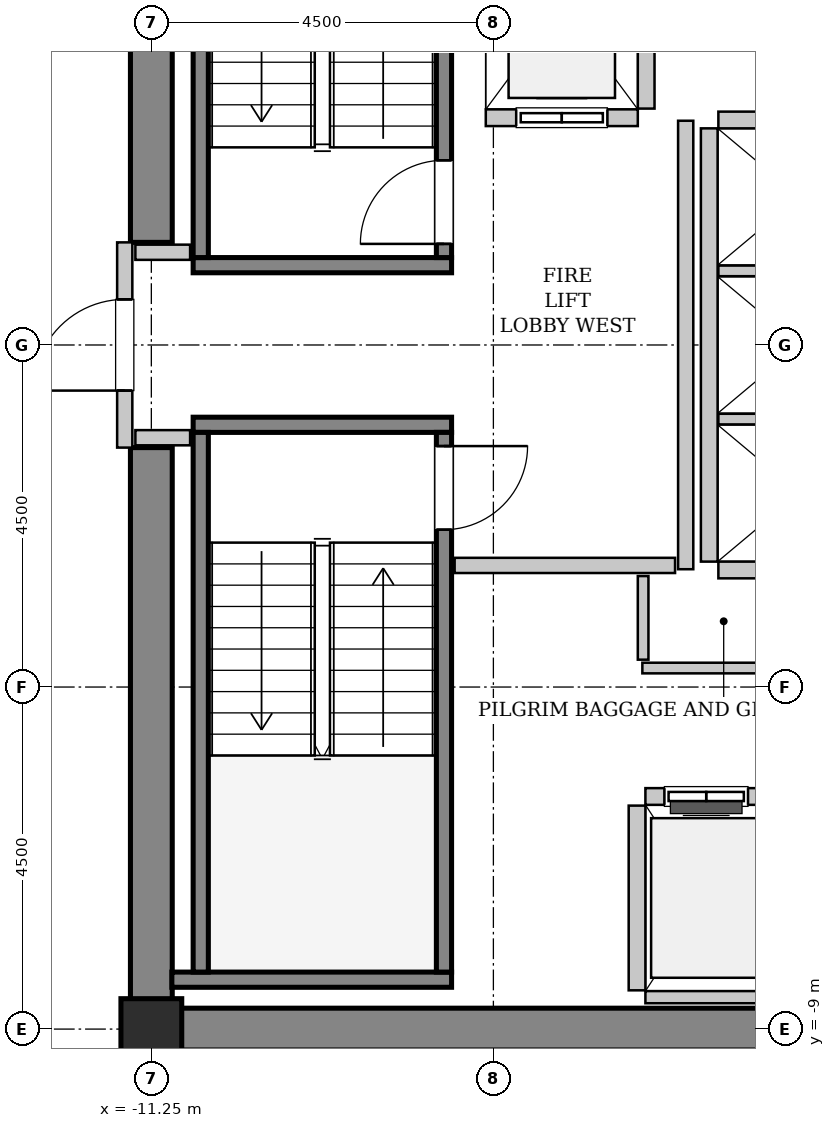
"""IFC4 building model, lengths in metres.
Left out: names, types, materials, properties, quantities, classifications, styles, units other than length and angle.
Written with IfcOpenShell. Run it as: python <this file> out.ifc"""

import sys

from ifc_helpers import new_model, si_unit, direction, frame, frame_2d, origin, origin_2d, place, context, subcontext, project, spatial, rectangle, hollow_rectangle, extrude, source, transform, mapped, element, fill, save


model = new_model("IFC4")
c1 = context("Model", 3, precision=1e-05, world=origin(), true_north=direction((0.0, 1.0)))
c2 = subcontext(c1, "Body", "Model", "MODEL_VIEW")
j1 = project(units=[si_unit("LENGTHUNIT", "METRE"), si_unit("PLANEANGLEUNIT", "RADIAN")], contexts=[c1])
p1 = place(None, origin())
s1 = spatial("IfcSite", under=j1, at=p1, CompositionType="ELEMENT")
p2 = place(p1, origin())
s2 = spatial("IfcBuilding", under=s1, at=p2, CompositionType="ELEMENT")
p3 = place(p2, frame((0.0, 0.0, 190.6)))
s3 = spatial("IfcBuildingStorey", under=s2, at=p3, CompositionType="ELEMENT", Elevation=190.6)
m1 = source(origin(), c2, "Body", "SweptSolid", [
    extrude(rectangle(XDim=9.975, YDim=0.55, at=frame_2d((4.987, 0.0))), origin(), (0.0, 0.0, 1.0), 3.8),
])
p4 = place(p3, frame((-11.525, -9.0, 0.0), z_axis=(0.0, 0.0, 1.0), x_axis=(1.0, 0.0, 0.0)))
e1 = element("IfcWall", 1, at=p4, inside=s3, PredefinedType="SHEAR", context=c2, shape_type="MappedRepresentation", body=[
    mapped(m1, transform((0.0, 0.0, 0.0), x_axis=(1.0, 0.0, 0.0), y_axis=(0.0, 1.0, 0.0), z_axis=(0.0, 0.0, 1.0), scale=1.0)),
])
m2 = source(origin(), c2, "Body", "SweptSolid", [
    extrude(rectangle(XDim=7.375, YDim=0.55, at=frame_2d((3.688, 0.0))), origin(), (0.0, 0.0, 1.0), 3.8),
])
for number, where, z_axis, x_axis in (
    (2, (-11.25, -8.725, 0.0), (0.0, 0.0, 1.0), (0.0, 1.0, 0.0)),
    (3, (-11.25, 1.35, 0.0), (0.0, 0.0, 1.0), (0.0, 1.0, 0.0)),
):
    element("IfcWall", number, at=place(p3, frame(where, z_axis=z_axis, x_axis=x_axis)), inside=s3, PredefinedType="SHEAR", context=c2, shape_type="MappedRepresentation", body=[
        mapped(m2, transform((0.0, 0.0, 0.0), x_axis=(1.0, 0.0, 0.0), y_axis=(0.0, 1.0, 0.0), z_axis=(0.0, 0.0, 1.0), scale=1.0)),
    ])
m3 = source(origin(), c2, "Body", "SweptSolid", [
    extrude(hollow_rectangle(XDim=0.8, YDim=0.8, WallThickness=0.04, InnerFilletRadius=0.04, OuterFilletRadius=0.08, at=origin_2d()), origin(), (0.0, 0.0, 1.0), 3.8),
])
p5 = place(p3, frame((-11.25, -9.0, 0.0), z_axis=(0.0, 0.0, 1.0), x_axis=(1.0, 0.0, 0.0)))
e4 = element("IfcColumn", 4, at=p5, inside=s3, PredefinedType="COLUMN", context=c2, shape_type="MappedRepresentation", body=[
    mapped(m3, transform((0.0, 0.0, 0.0), x_axis=(1.0, 0.0, 0.0), y_axis=(0.0, 1.0, 0.0), z_axis=(0.0, 0.0, 1.0), scale=1.0)),
])
m4 = source(origin(), c2, "Body", "SweptSolid", [
    extrude(rectangle(XDim=3.4, YDim=0.2, at=frame_2d((1.7, 0.0))), origin(), (0.0, 0.0, 1.0), 3.8),
])
p6 = place(p3, frame((-7.3, 1.05, 0.0), z_axis=(0.0, 0.0, 1.0), x_axis=(-1.0, 0.0, 0.0)))
e5 = element("IfcWall", 5, at=p6, inside=s3, PredefinedType="SOLIDWALL", context=c2, shape_type="MappedRepresentation", body=[
    mapped(m4, transform((0.0, 0.0, 0.0), x_axis=(1.0, 0.0, 0.0), y_axis=(0.0, 1.0, 0.0), z_axis=(0.0, 0.0, 1.0), scale=1.0)),
])
m5 = source(origin(), c2, "Body", "SweptSolid", [
    extrude(rectangle(XDim=7.1, YDim=0.2, at=frame_2d((3.55, 0.0))), origin(), (0.0, 0.0, 1.0), 3.8),
])
p7 = place(p3, frame((-7.4, 1.15, 0.0), z_axis=(0.0, 0.0, 1.0), x_axis=(0.0, 1.0, 0.0)))
e6 = element("IfcWall", 6, at=p7, inside=s3, PredefinedType="SOLIDWALL", context=c2, shape_type="MappedRepresentation", body=[
    mapped(m5, transform((0.0, 0.0, 0.0), x_axis=(1.0, 0.0, 0.0), y_axis=(0.0, 1.0, 0.0), z_axis=(0.0, 0.0, 1.0), scale=1.0)),
])
p8 = place(p7, frame((0.18, 0.0, 0.0)))
e7 = element("IfcOpeningElement", 7, at=p8, cuts=e6, PredefinedType="OPENING", context=c2, shape_type="SweptSolid", body=[
    extrude(rectangle(XDim=1.1, YDim=2.15, at=frame_2d((0.55, 1.075))), frame((0.0, 0.11, 0.0), z_axis=(0.0, -1.0, 0.0), x_axis=(1.0, 0.0, 0.0)), (0.0, 0.0, 1.0), 0.22),
])
p9 = place(p3, frame((-10.6, 1.15, 0.0), z_axis=(0.0, 0.0, 1.0), x_axis=(0.0, 1.0, 0.0)))
e8 = element("IfcWall", 8, at=p9, inside=s3, PredefinedType="SOLIDWALL", context=c2, shape_type="MappedRepresentation", body=[
    mapped(m5, transform((0.0, 0.0, 0.0), x_axis=(1.0, 0.0, 0.0), y_axis=(0.0, 1.0, 0.0), z_axis=(0.0, 0.0, 1.0), scale=1.0)),
])
p10 = place(p3, frame((-10.7, -1.05, 0.0), z_axis=(0.0, 0.0, 1.0), x_axis=(1.0, 0.0, 0.0)))
e9 = element("IfcWall", 9, at=p10, inside=s3, PredefinedType="SOLIDWALL", context=c2, shape_type="MappedRepresentation", body=[
    mapped(m4, transform((0.0, 0.0, 0.0), x_axis=(1.0, 0.0, 0.0), y_axis=(0.0, 1.0, 0.0), z_axis=(0.0, 0.0, 1.0), scale=1.0)),
])
m6 = source(origin(), c2, "Body", "SweptSolid", [
    extrude(rectangle(XDim=3.68, YDim=0.2, at=frame_2d((1.84, 0.0))), origin(), (0.0, 0.0, 1.0), 3.8),
])
p11 = place(p3, frame((-10.98, -8.35, 0.0), z_axis=(0.0, 0.0, 1.0), x_axis=(1.0, 0.0, 0.0)))
e10 = element("IfcWall", 10, at=p11, inside=s3, PredefinedType="SOLIDWALL", context=c2, shape_type="MappedRepresentation", body=[
    mapped(m6, transform((0.0, 0.0, 0.0), x_axis=(1.0, 0.0, 0.0), y_axis=(0.0, 1.0, 0.0), z_axis=(0.0, 0.0, 1.0), scale=1.0)),
])
p12 = place(p3, frame((-10.6, -1.15, 0.0), z_axis=(0.0, 0.0, 1.0), x_axis=(0.0, -1.0, 0.0)))
e11 = element("IfcWall", 11, at=p12, inside=s3, PredefinedType="SOLIDWALL", context=c2, shape_type="MappedRepresentation", body=[
    mapped(m5, transform((0.0, 0.0, 0.0), x_axis=(1.0, 0.0, 0.0), y_axis=(0.0, 1.0, 0.0), z_axis=(0.0, 0.0, 1.0), scale=1.0)),
])
p13 = place(p3, frame((-7.4, -1.15, 0.0), z_axis=(0.0, 0.0, 1.0), x_axis=(0.0, -1.0, 0.0)))
e12 = element("IfcWall", 12, at=p13, inside=s3, PredefinedType="SOLIDWALL", context=c2, shape_type="MappedRepresentation", body=[
    mapped(m5, transform((0.0, 0.0, 0.0), x_axis=(1.0, 0.0, 0.0), y_axis=(0.0, 1.0, 0.0), z_axis=(0.0, 0.0, 1.0), scale=1.0)),
])
p14 = place(p13, frame((0.18, 0.0, 0.0)))
e13 = element("IfcOpeningElement", 13, at=p14, cuts=e12, PredefinedType="OPENING", context=c2, shape_type="SweptSolid", body=[
    extrude(rectangle(XDim=1.1, YDim=2.15, at=frame_2d((0.55, 1.075))), frame((0.0, 0.11, 0.0), z_axis=(0.0, -1.0, 0.0), x_axis=(1.0, 0.0, 0.0)), (0.0, 0.0, 1.0), 0.22),
])
m7 = source(origin(), c2, "Body", "SweptSolid", [
    extrude(rectangle(XDim=2.0, YDim=0.22, at=frame_2d((1.0, 0.0))), origin(), (0.0, 0.0, 1.0), 3.535),
])
p15 = place(p3, frame((-6.85, 2.99, 0.0), z_axis=(0.0, 0.0, 1.0), x_axis=(1.0, 0.0, 0.0)))
e14 = element("IfcWall", 14, at=p15, inside=s3, PredefinedType="SOLIDWALL", context=c2, shape_type="MappedRepresentation", body=[
    mapped(m7, transform((0.0, 0.0, 0.0), x_axis=(1.0, 0.0, 0.0), y_axis=(0.0, 1.0, 0.0), z_axis=(0.0, 0.0, 1.0), scale=1.0)),
])
p16 = place(p15, frame((0.4, 0.0, 0.0)))
e15 = element("IfcOpeningElement", 15, at=p16, cuts=e14, PredefinedType="OPENING", context=c2, shape_type="SweptSolid", body=[
    extrude(rectangle(XDim=1.2, YDim=2.2, at=frame_2d((0.6, 1.1))), frame((0.0, 0.12, 0.0), z_axis=(0.0, -1.0, 0.0), x_axis=(1.0, 0.0, 0.0)), (0.0, 0.0, 1.0), 0.24),
])
m8 = source(origin(), c2, "Body", "SweptSolid", [
    extrude(rectangle(XDim=2.68, YDim=0.22, at=frame_2d((1.34, 0.0))), origin(), (0.0, 0.0, 1.0), 3.535),
])
p17 = place(p3, frame((-4.74, 3.11, 0.0), z_axis=(0.0, 0.0, 1.0), x_axis=(0.0, 1.0, 0.0)))
e16 = element("IfcWall", 16, at=p17, inside=s3, PredefinedType="SOLIDWALL", context=c2, shape_type="MappedRepresentation", body=[
    mapped(m8, transform((0.0, 0.0, 0.0), x_axis=(1.0, 0.0, 0.0), y_axis=(0.0, 1.0, 0.0), z_axis=(0.0, 0.0, 1.0), scale=1.0)),
])
m9 = source(origin(), c2, "Body", "SweptSolid", [
    extrude(rectangle(XDim=3.2, YDim=0.22, at=frame_2d((1.6, 0.0))), origin(), (0.0, 0.0, 1.0), 3.535),
])
p18 = place(p3, frame((-1.55, -5.94, 0.0), z_axis=(0.0, 0.0, 1.0), x_axis=(-1.0, 0.0, 0.0)))
e17 = element("IfcWall", 17, at=p18, inside=s3, PredefinedType="SOLIDWALL", context=c2, shape_type="MappedRepresentation", body=[
    mapped(m9, transform((0.0, 0.0, 0.0), x_axis=(1.0, 0.0, 0.0), y_axis=(0.0, 1.0, 0.0), z_axis=(0.0, 0.0, 1.0), scale=1.0)),
])
p19 = place(p18, frame((1.85, 0.0, 0.0)))
e18 = element("IfcOpeningElement", 18, at=p19, cuts=e17, PredefinedType="OPENING", context=c2, shape_type="SweptSolid", body=[
    extrude(rectangle(XDim=1.1, YDim=2.2, at=frame_2d((0.55, 1.1))), frame((0.0, 0.12, 0.0), z_axis=(0.0, -1.0, 0.0), x_axis=(1.0, 0.0, 0.0)), (0.0, 0.0, 1.0), 0.24),
])
p20 = place(p18, frame((0.225, 0.0, 0.0)))
e19 = element("IfcOpeningElement", 19, at=p20, cuts=e17, PredefinedType="OPENING", context=c2, shape_type="SweptSolid", body=[
    extrude(rectangle(XDim=1.1, YDim=2.2, at=frame_2d((0.55, 1.1))), frame((0.0, 0.12, 0.0), z_axis=(0.0, -1.0, 0.0), x_axis=(1.0, 0.0, 0.0)), (0.0, 0.0, 1.0), 0.24),
])
m10 = source(origin(), c2, "Body", "SweptSolid", [
    extrude(rectangle(XDim=3.2, YDim=0.16, at=frame_2d((1.6, 0.0))), origin(), (0.0, 0.0, 1.0), 2.425),
])
p21 = place(p3, frame((-4.75, -8.58, 0.0), z_axis=(0.0, 0.0, 1.0), x_axis=(1.0, 0.0, 0.0)))
e20 = element("IfcWall", 20, at=p21, inside=s3, PredefinedType="PARTITIONING", context=c2, shape_type="MappedRepresentation", body=[
    mapped(m10, transform((0.0, 0.0, 0.0), x_axis=(1.0, 0.0, 0.0), y_axis=(0.0, 1.0, 0.0), z_axis=(0.0, 0.0, 1.0), scale=1.0)),
])
m11 = source(origin(), c2, "Body", "SweptSolid", [
    extrude(rectangle(XDim=2.43, YDim=0.22, at=frame_2d((1.215, 0.0))), origin(), (0.0, 0.0, 1.0), 3.535),
])
p22 = place(p3, frame((-4.86, -6.06, 0.0), z_axis=(0.0, 0.0, 1.0), x_axis=(0.0, -1.0, 0.0)))
e21 = element("IfcWall", 21, at=p22, inside=s3, PredefinedType="SOLIDWALL", context=c2, shape_type="MappedRepresentation", body=[
    mapped(m11, transform((0.0, 0.0, 0.0), x_axis=(1.0, 0.0, 0.0), y_axis=(0.0, 1.0, 0.0), z_axis=(0.0, 0.0, 1.0), scale=1.0)),
])
m12 = source(origin(), c2, "Body", "SweptSolid", [
    extrude(rectangle(XDim=5.7, YDim=0.22, at=frame_2d((2.85, 0.0))), origin(), (0.0, 0.0, 1.0), 3.535),
])
p23 = place(p3, frame((-3.91, 2.85, 0.0), z_axis=(0.0, 0.0, 1.0), x_axis=(0.0, -1.0, 0.0)))
e22 = element("IfcWall", 22, at=p23, inside=s3, PredefinedType="SOLIDWALL", context=c2, shape_type="MappedRepresentation", body=[
    mapped(m12, transform((0.0, 0.0, 0.0), x_axis=(1.0, 0.0, 0.0), y_axis=(0.0, 1.0, 0.0), z_axis=(0.0, 0.0, 1.0), scale=1.0)),
])
m13 = source(origin(), c2, "Body", "SweptSolid", [
    extrude(rectangle(XDim=2.13, YDim=0.22, at=frame_2d((1.065, 0.0))), origin(), (0.0, 0.0, 1.0), 3.535),
])
p24 = place(p3, frame((-3.79, -2.96, 0.0), z_axis=(0.0, 0.0, 1.0), x_axis=(1.0, 0.0, 0.0)))
e23 = element("IfcWall", 23, at=p24, inside=s3, PredefinedType="SOLIDWALL", context=c2, shape_type="MappedRepresentation", body=[
    mapped(m13, transform((0.0, 0.0, 0.0), x_axis=(1.0, 0.0, 0.0), y_axis=(0.0, 1.0, 0.0), z_axis=(0.0, 0.0, 1.0), scale=1.0)),
])
m14 = source(origin(), c2, "Body", "SweptSolid", [
    extrude(rectangle(XDim=2.13, YDim=0.14, at=frame_2d((1.065, 0.0))), origin(), (0.0, 0.0, 1.0), 3.535),
])
for number, where, z_axis, x_axis in (
    (24, (-3.79, -0.975, 0.0), (0.0, 0.0, 1.0), (1.0, 0.0, 0.0)),
    (25, (-3.79, 0.975, 0.0), (0.0, 0.0, 1.0), (1.0, 0.0, 0.0)),
):
    element("IfcWall", number, at=place(p3, frame(where, z_axis=z_axis, x_axis=x_axis)), inside=s3, PredefinedType="PARTITIONING", context=c2, shape_type="MappedRepresentation", body=[
        mapped(m14, transform((0.0, 0.0, 0.0), x_axis=(1.0, 0.0, 0.0), y_axis=(0.0, 1.0, 0.0), z_axis=(0.0, 0.0, 1.0), scale=1.0)),
    ])
p25 = place(p3, frame((-1.66, 2.96, 0.0), z_axis=(0.0, 0.0, 1.0), x_axis=(-1.0, 0.0, 0.0)))
e26 = element("IfcWall", 26, at=p25, inside=s3, PredefinedType="SOLIDWALL", context=c2, shape_type="MappedRepresentation", body=[
    mapped(m13, transform((0.0, 0.0, 0.0), x_axis=(1.0, 0.0, 0.0), y_axis=(0.0, 1.0, 0.0), z_axis=(0.0, 0.0, 1.0), scale=1.0)),
])
m15 = source(origin(), c2, "Body", "SweptSolid", [
    extrude(rectangle(XDim=2.7, YDim=0.2, at=frame_2d((1.35, 0.0))), origin(), (0.0, 0.0, 1.0), 2.425),
])
p26 = place(p3, frame((-11.6, -1.35, 0.0), z_axis=(0.0, 0.0, 1.0), x_axis=(0.0, 1.0, 0.0)))
e27 = element("IfcWall", 27, at=p26, inside=s3, PredefinedType="PARTITIONING", context=c2, shape_type="MappedRepresentation", body=[
    mapped(m15, transform((0.0, 0.0, 0.0), x_axis=(1.0, 0.0, 0.0), y_axis=(0.0, 1.0, 0.0), z_axis=(0.0, 0.0, 1.0), scale=1.0)),
])
p27 = place(p26, frame((0.75, 0.0, 0.0)))
e28 = element("IfcOpeningElement", 28, at=p27, cuts=e27, PredefinedType="OPENING", context=c2, shape_type="SweptSolid", body=[
    extrude(rectangle(XDim=1.2, YDim=2.15, at=frame_2d((0.6, 1.075))), frame((0.0, 0.11, 0.0), z_axis=(0.0, -1.0, 0.0), x_axis=(1.0, 0.0, 0.0)), (0.0, 0.0, 1.0), 0.22),
])
m16 = source(origin(), c2, "Body", "SweptSolid", [
    extrude(rectangle(XDim=5.9, YDim=0.2, at=frame_2d((2.95, 0.0))), origin(), (0.0, 0.0, 1.0), 3.535),
])
p28 = place(p3, frame((-4.22, -2.95, 0.0), z_axis=(0.0, 0.0, 1.0), x_axis=(0.0, 1.0, 0.0)))
e29 = element("IfcWall", 29, at=p28, inside=s3, PredefinedType="PARTITIONING", context=c2, shape_type="MappedRepresentation", body=[
    mapped(m16, transform((0.0, 0.0, 0.0), x_axis=(1.0, 0.0, 0.0), y_axis=(0.0, 1.0, 0.0), z_axis=(0.0, 0.0, 1.0), scale=1.0)),
])
m17 = source(origin(), c2, "Body", "SweptSolid", [
    extrude(rectangle(XDim=2.9, YDim=0.2, at=frame_2d((1.45, 0.0))), origin(), (0.0, 0.0, 1.0), 3.535),
])
p29 = place(p3, frame((-7.26, -2.9, 0.0), z_axis=(0.0, 0.0, 1.0), x_axis=(1.0, 0.0, 0.0)))
e30 = element("IfcWall", 30, at=p29, inside=s3, PredefinedType="PARTITIONING", context=c2, shape_type="MappedRepresentation", body=[
    mapped(m17, transform((0.0, 0.0, 0.0), x_axis=(1.0, 0.0, 0.0), y_axis=(0.0, 1.0, 0.0), z_axis=(0.0, 0.0, 1.0), scale=1.0)),
])
m18 = source(origin(), c2, "Body", "SweptSolid", [
    extrude(rectangle(XDim=0.72, YDim=0.2, at=frame_2d((0.36, 0.0))), origin(), (0.0, 0.0, 1.0), 3.535),
])
for number, where, z_axis, x_axis in (
    (31, (-11.46, 1.22, 0.0), (0.0, 0.0, 1.0), (1.0, 0.0, 0.0)),
    (32, (-11.46, -1.22, 0.0), (0.0, 0.0, 1.0), (1.0, 0.0, 0.0)),
):
    element("IfcWall", number, at=place(p3, frame(where, z_axis=z_axis, x_axis=x_axis)), inside=s3, PredefinedType="PARTITIONING", context=c2, shape_type="MappedRepresentation", body=[
        mapped(m18, transform((0.0, 0.0, 0.0), x_axis=(1.0, 0.0, 0.0), y_axis=(0.0, 1.0, 0.0), z_axis=(0.0, 0.0, 1.0), scale=1.0)),
    ])
m19 = source(origin(), c2, "Body", "SweptSolid", [
    extrude(rectangle(XDim=3.15, YDim=0.14, at=frame_2d((1.575, 0.0))), origin(), (0.0, 0.0, 1.0), 3.535),
])
p30 = place(p3, frame((-4.79, -4.25, 0.0), z_axis=(0.0, 0.0, 1.0), x_axis=(1.0, 0.0, 0.0)))
e33 = element("IfcWall", 33, at=p30, inside=s3, PredefinedType="PARTITIONING", context=c2, shape_type="MappedRepresentation", body=[
    mapped(m19, transform((0.0, 0.0, 0.0), x_axis=(1.0, 0.0, 0.0), y_axis=(0.0, 1.0, 0.0), z_axis=(0.0, 0.0, 1.0), scale=1.0)),
])
m20 = source(origin(), c2, "Body", "SweptSolid", [
    extrude(rectangle(XDim=1.1, YDim=0.14, at=frame_2d((0.55, 0.0))), origin(), (0.0, 0.0, 1.0), 3.535),
])
p31 = place(p3, frame((-4.78, -4.14, 0.0), z_axis=(0.0, 0.0, 1.0), x_axis=(0.0, 1.0, 0.0)))
e34 = element("IfcWall", 34, at=p31, inside=s3, PredefinedType="PARTITIONING", context=c2, shape_type="MappedRepresentation", body=[
    mapped(m20, transform((0.0, 0.0, 0.0), x_axis=(1.0, 0.0, 0.0), y_axis=(0.0, 1.0, 0.0), z_axis=(0.0, 0.0, 1.0), scale=1.0)),
])
m21 = source(origin(), c2, "Body", "SweptSolid", [
    extrude(rectangle(XDim=1.1, YDim=2.15, at=frame_2d((0.55, 1.075))), frame((0.0, 0.025, 0.0), z_axis=(0.0, -1.0, 0.0), x_axis=(1.0, 0.0, 0.0)), (0.0, 0.0, 1.0), 0.05),
])
p32 = place(p8, origin())
e35 = element("IfcDoor", 35, at=p32, inside=s3, OperationType="SINGLE_SWING_LEFT", PredefinedType="DOOR", context=c2, shape_type="MappedRepresentation", body=[
    mapped(m21, transform((0.0, 0.0, 0.0), x_axis=(1.0, 0.0, 0.0), y_axis=(0.0, 1.0, 0.0), z_axis=(0.0, 0.0, 1.0), scale=1.0)),
])
fill(e7, e35)
p33 = place(p14, origin())
e36 = element("IfcDoor", 36, at=p33, inside=s3, OperationType="SINGLE_SWING_LEFT", PredefinedType="DOOR", context=c2, shape_type="MappedRepresentation", body=[
    mapped(m21, transform((0.0, 0.0, 0.0), x_axis=(1.0, 0.0, 0.0), y_axis=(0.0, 1.0, 0.0), z_axis=(0.0, 0.0, 1.0), scale=1.0)),
])
fill(e13, e36)
m22 = source(origin(), c2, "Body", "SweptSolid", [
    extrude(rectangle(XDim=1.2, YDim=2.2, at=frame_2d((0.6, 1.1))), frame((0.0, 0.025, 0.0), z_axis=(0.0, -1.0, 0.0), x_axis=(1.0, 0.0, 0.0)), (0.0, 0.0, 1.0), 0.05),
])
p34 = place(p16, origin())
e37 = element("IfcDoor", 37, at=p34, inside=s3, OperationType="SLIDING_TO_LEFT", PredefinedType="DOOR", context=c2, shape_type="MappedRepresentation", body=[
    mapped(m22, transform((0.0, 0.0, 0.0), x_axis=(1.0, 0.0, 0.0), y_axis=(0.0, 1.0, 0.0), z_axis=(0.0, 0.0, 1.0), scale=1.0)),
])
fill(e15, e37)
m23 = source(origin(), c2, "Body", "SweptSolid", [
    extrude(rectangle(XDim=1.1, YDim=2.2, at=frame_2d((0.55, 1.1))), frame((0.0, 0.025, 0.0), z_axis=(0.0, -1.0, 0.0), x_axis=(1.0, 0.0, 0.0)), (0.0, 0.0, 1.0), 0.05),
])
p35 = place(p19, origin())
e38 = element("IfcDoor", 38, at=p35, inside=s3, OperationType="DOUBLE_DOOR_SLIDING", PredefinedType="DOOR", context=c2, shape_type="MappedRepresentation", body=[
    mapped(m23, transform((0.0, 0.0, 0.0), x_axis=(1.0, 0.0, 0.0), y_axis=(0.0, 1.0, 0.0), z_axis=(0.0, 0.0, 1.0), scale=1.0)),
])
fill(e18, e38)
m24 = source(origin(), c2, "Body", "SweptSolid", [
    extrude(rectangle(XDim=1.2, YDim=2.15, at=frame_2d((0.6, 1.075))), frame((0.0, 0.025, 0.0), z_axis=(0.0, -1.0, 0.0), x_axis=(1.0, 0.0, 0.0)), (0.0, 0.0, 1.0), 0.05),
])
p36 = place(p27, origin())
e39 = element("IfcDoor", 39, at=p36, inside=s3, OperationType="SINGLE_SWING_LEFT", PredefinedType="DOOR", context=c2, shape_type="MappedRepresentation", body=[
    mapped(m24, transform((0.0, 0.0, 0.0), x_axis=(1.0, 0.0, 0.0), y_axis=(0.0, 1.0, 0.0), z_axis=(0.0, 0.0, 1.0), scale=1.0)),
])
fill(e28, e39)
save(model, sys.argv[1])
